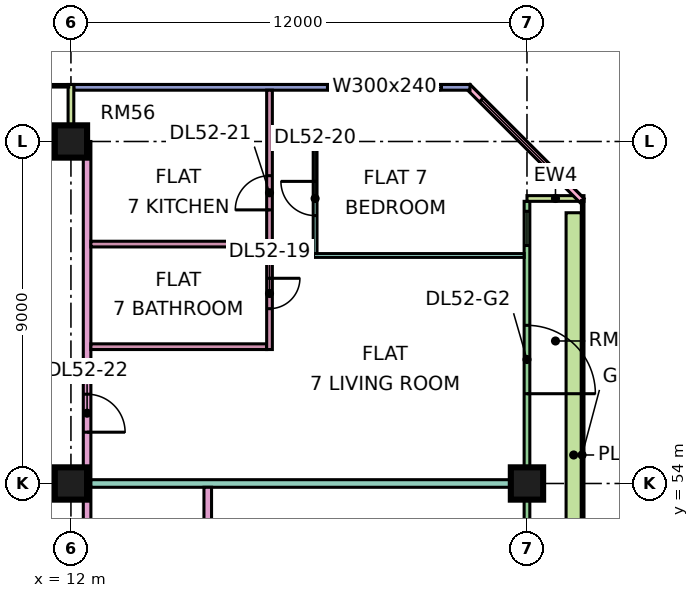
"""IFC4 building model, lengths in metres.
Left out: names, types, materials, properties, quantities, classifications, styles, units other than length and angle.
Written with IfcOpenShell. Run it as: python <this file> out.ifc"""

import sys

from ifc_helpers import new_model, si_unit, direction, frame, frame_2d, origin, origin_2d, place, context, subcontext, project, spatial, rectangle, extrude, element, fill, save


model = new_model("IFC4")
c1 = context("Model", 3, precision=1e-05, world=origin(), true_north=direction((0.0, 1.0)))
c2 = subcontext(c1, "Body", "Model", "MODEL_VIEW")
j1 = project(units=[si_unit("LENGTHUNIT", "METRE"), si_unit("PLANEANGLEUNIT", "RADIAN")], contexts=[c1])
p1 = place(None, origin())
s1 = spatial("IfcSite", under=j1, at=p1, CompositionType="ELEMENT")
p2 = place(p1, origin())
s2 = spatial("IfcBuilding", under=s1, at=p2, CompositionType="ELEMENT")
p3 = place(p2, frame((0.0, 0.0, 222.9)))
s3 = spatial("IfcBuildingStorey", under=s2, at=p3, CompositionType="ELEMENT", Elevation=222.9)
for number, where, z_axis, x_axis in (
    (1, (12.0, 54.0, 0.0), (0.0, 0.0, 1.0), (1.0, 0.0, 0.0)),
    (2, (12.0, 63.0, 0.0), (0.0, 0.0, 1.0), (1.0, 0.0, 0.0)),
    (3, (24.0, 54.0, 0.0), (0.0, 0.0, 1.0), (1.0, 0.0, 0.0)),
):
    element("IfcColumn", number, at=place(p3, frame(where, z_axis=z_axis, x_axis=x_axis)), inside=s3, PredefinedType="COLUMN", context=c2, shape_type="SweptSolid", body=[
        extrude(rectangle(XDim=0.85, YDim=0.85, at=origin_2d()), origin(), (0.0, 0.0, 1.0), 3.75),
    ])
p4 = place(p3, frame((24.0, 48.075, 0.0), z_axis=(0.0, 0.0, 1.0), x_axis=(0.0, 1.0, 0.0)))
e4 = element("IfcWall", 4, at=p4, inside=s3, PredefinedType="SOLIDWALL", context=c2, shape_type="SweptSolid", body=[
    extrude(rectangle(XDim=13.35, YDim=0.15, at=frame_2d((6.675, 0.0))), origin(), (0.0, 0.0, 1.0), 3.35),
])
p5 = place(p4, frame((0.6, 0.0, 0.45)))
e5 = element("IfcOpeningElement", 5, at=p5, cuts=e4, PredefinedType="OPENING", context=c2, shape_type="SweptSolid", body=[
    extrude(rectangle(XDim=4.2, YDim=2.4, at=frame_2d((2.1, 1.2))), frame((0.0, 0.085, 0.0), z_axis=(0.0, -1.0, 0.0), x_axis=(1.0, 0.0, 0.0)), (0.0, 0.0, 1.0), 0.17),
])
p6 = place(p4, frame((8.288, 0.0, 0.0)))
e6 = element("IfcOpeningElement", 6, at=p6, cuts=e4, PredefinedType="OPENING", context=c2, shape_type="SweptSolid", body=[
    extrude(rectangle(XDim=1.8, YDim=2.4, at=frame_2d((0.9, 1.2))), frame((0.0, 0.085, 0.0), z_axis=(0.0, -1.0, 0.0), x_axis=(1.0, 0.0, 0.0)), (0.0, 0.0, 1.0), 0.17),
])
p7 = place(p4, frame((12.188, 0.0, 0.45)))
e7 = element("IfcOpeningElement", 7, at=p7, cuts=e4, PredefinedType="OPENING", context=c2, shape_type="SweptSolid", body=[
    extrude(rectangle(XDim=0.9, YDim=2.4, at=frame_2d((0.45, 1.2))), frame((0.0, 0.085, 0.0), z_axis=(0.0, -1.0, 0.0), x_axis=(1.0, 0.0, 0.0)), (0.0, 0.0, 1.0), 0.17),
])
p8 = place(p3, frame((25.5, 61.5, 0.0), z_axis=(0.0, 0.0, 1.0), x_axis=(-1.0, 0.0, 0.0)))
e8 = element("IfcWall", 8, at=p8, inside=s3, PredefinedType="SOLIDWALL", context=c2, shape_type="SweptSolid", body=[
    extrude(rectangle(XDim=1.5, YDim=0.15, at=frame_2d((0.75, 0.0))), origin(), (0.0, 0.0, 1.0), 3.35),
])
p9 = place(p3, frame((25.447, 61.447, 0.0), z_axis=(0.0, 0.0, 1.0), x_axis=(-0.707106781187, 0.707106781187, 0.0)))
e9 = element("IfcWall", 9, at=p9, inside=s3, PredefinedType="SOLIDWALL", context=c2, shape_type="SweptSolid", body=[
    extrude(rectangle(XDim=4.243, YDim=0.15, at=frame_2d((2.121, 0.0))), origin(), (0.0, 0.0, 1.0), 3.35),
])
p10 = place(p9, frame((0.744, 0.0, 0.45)))
e10 = element("IfcOpeningElement", 10, at=p10, cuts=e9, PredefinedType="OPENING", context=c2, shape_type="SweptSolid", body=[
    extrude(rectangle(XDim=3.0, YDim=2.4, at=frame_2d((1.5, 1.2))), frame((0.0, 0.085, 0.0), z_axis=(0.0, -1.0, 0.0), x_axis=(1.0, 0.0, 0.0)), (0.0, 0.0, 1.0), 0.17),
])
p11 = place(p3, frame((22.5, 64.425, 0.0), z_axis=(0.0, 0.0, 1.0), x_axis=(-1.0, 0.0, 0.0)))
e11 = element("IfcWall", 11, at=p11, inside=s3, PredefinedType="SOLIDWALL", context=c2, shape_type="SweptSolid", body=[
    extrude(rectangle(XDim=10.425, YDim=0.15, at=frame_2d((5.212, 0.0))), origin(), (0.0, 0.0, 1.0), 3.35),
])
p12 = place(p11, frame((0.75, 0.0, 0.45)))
e12 = element("IfcOpeningElement", 12, at=p12, cuts=e11, PredefinedType="OPENING", context=c2, shape_type="SweptSolid", body=[
    extrude(rectangle(XDim=3.0, YDim=2.4, at=frame_2d((1.5, 1.2))), frame((0.0, 0.085, 0.0), z_axis=(0.0, -1.0, 0.0), x_axis=(1.0, 0.0, 0.0)), (0.0, 0.0, 1.0), 0.17),
])
p13 = place(p3, frame((11.925, 63.0, 0.0), z_axis=(0.0, 0.0, 1.0), x_axis=(-1.0, 0.0, 0.0)))
e13 = element("IfcWall", 13, at=p13, inside=s3, PredefinedType="SOLIDWALL", context=c2, shape_type="SweptSolid", body=[
    extrude(rectangle(XDim=10.35, YDim=0.15, at=frame_2d((5.175, 0.0))), origin(), (0.0, 0.0, 1.0), 3.35),
])
p14 = place(p13, frame((2.775, 0.0, 0.45)))
e14 = element("IfcOpeningElement", 14, at=p14, cuts=e13, PredefinedType="OPENING", context=c2, shape_type="SweptSolid", body=[
    extrude(rectangle(XDim=1.8, YDim=2.4, at=frame_2d((0.9, 1.2))), frame((0.0, 0.085, 0.0), z_axis=(0.0, -1.0, 0.0), x_axis=(1.0, 0.0, 0.0)), (0.0, 0.0, 1.0), 0.17),
])
p15 = place(p13, frame((6.788, 0.0, 0.0)))
e15 = element("IfcOpeningElement", 15, at=p15, cuts=e13, PredefinedType="OPENING", context=c2, shape_type="SweptSolid", body=[
    extrude(rectangle(XDim=1.8, YDim=2.4, at=frame_2d((0.9, 1.2))), frame((0.0, 0.085, 0.0), z_axis=(0.0, -1.0, 0.0), x_axis=(1.0, 0.0, 0.0)), (0.0, 0.0, 1.0), 0.17),
])
p16 = place(p3, frame((12.0, 64.5, 0.0), z_axis=(0.0, 0.0, 1.0), x_axis=(0.0, -1.0, 0.0)))
e16 = element("IfcWall", 16, at=p16, inside=s3, PredefinedType="SOLIDWALL", context=c2, shape_type="SweptSolid", body=[
    extrude(rectangle(XDim=1.5, YDim=0.15, at=frame_2d((0.75, 0.0))), origin(), (0.0, 0.0, 1.0), 3.35),
])
p17 = place(p3, frame((25.229, 48.375, 0.0), z_axis=(0.0, 0.0, 1.0), x_axis=(0.0, 1.0, 0.0)))
e17 = element("IfcWall", 17, at=p17, inside=s3, PredefinedType="SOLIDWALL", context=c2, shape_type="SweptSolid", body=[
    extrude(rectangle(XDim=12.75, YDim=0.4, at=frame_2d((6.375, 0.0))), origin(), (0.0, 0.0, 1.0), 0.7),
])
p18 = place(p3, frame((12.425, 20.0, 0.0), z_axis=(0.0, 0.0, 1.0), x_axis=(0.0, 1.0, 0.0)))
e18 = element("IfcWall", 18, at=p18, inside=s3, PredefinedType="PARTITIONING", context=c2, shape_type="SweptSolid", body=[
    extrude(rectangle(XDim=43.0, YDim=0.2, at=frame_2d((21.5, 0.0))), origin(), (0.0, 0.0, 1.0), 3.35),
])
p19 = place(p18, frame((7.15, 0.0, 0.0)))
e19 = element("IfcOpeningElement", 19, at=p19, cuts=e18, PredefinedType="OPENING", context=c2, shape_type="SweptSolid", body=[
    extrude(rectangle(XDim=1.6, YDim=2.1, at=frame_2d((0.8, 1.05))), frame((0.0, 0.11, 0.0), z_axis=(0.0, -1.0, 0.0), x_axis=(1.0, 0.0, 0.0)), (0.0, 0.0, 1.0), 0.22),
])
p20 = place(p18, frame((13.5, 0.0, 0.0)))
e20 = element("IfcOpeningElement", 20, at=p20, cuts=e18, PredefinedType="OPENING", context=c2, shape_type="SweptSolid", body=[
    extrude(rectangle(XDim=1.0, YDim=2.1, at=frame_2d((0.5, 1.05))), frame((0.0, 0.11, 0.0), z_axis=(0.0, -1.0, 0.0), x_axis=(1.0, 0.0, 0.0)), (0.0, 0.0, 1.0), 0.22),
])
p21 = place(p18, frame((22.9, 0.0, 0.0)))
e21 = element("IfcOpeningElement", 21, at=p21, cuts=e18, PredefinedType="OPENING", context=c2, shape_type="SweptSolid", body=[
    extrude(rectangle(XDim=1.0, YDim=2.1, at=frame_2d((0.5, 1.05))), frame((0.0, 0.11, 0.0), z_axis=(0.0, -1.0, 0.0), x_axis=(1.0, 0.0, 0.0)), (0.0, 0.0, 1.0), 0.22),
])
p22 = place(p18, frame((35.35, 0.0, 0.0)))
e22 = element("IfcOpeningElement", 22, at=p22, cuts=e18, PredefinedType="OPENING", context=c2, shape_type="SweptSolid", body=[
    extrude(rectangle(XDim=1.0, YDim=2.1, at=frame_2d((0.5, 1.05))), frame((0.0, 0.11, 0.0), z_axis=(0.0, -1.0, 0.0), x_axis=(1.0, 0.0, 0.0)), (0.0, 0.0, 1.0), 0.22),
])
p23 = place(p18, frame((1.15, 0.0, 0.0)))
e23 = element("IfcOpeningElement", 23, at=p23, cuts=e18, PredefinedType="OPENING", context=c2, shape_type="SweptSolid", body=[
    extrude(rectangle(XDim=1.8, YDim=2.1, at=frame_2d((0.9, 1.05))), frame((0.0, 0.11, 0.0), z_axis=(0.0, -1.0, 0.0), x_axis=(1.0, 0.0, 0.0)), (0.0, 0.0, 1.0), 0.22),
])
p24 = place(p18, frame((28.6, 0.0, 0.0)))
e24 = element("IfcOpeningElement", 24, at=p24, cuts=e18, PredefinedType="OPENING", context=c2, shape_type="SweptSolid", body=[
    extrude(rectangle(XDim=1.8, YDim=2.1, at=frame_2d((0.9, 1.05))), frame((0.0, 0.11, 0.0), z_axis=(0.0, -1.0, 0.0), x_axis=(1.0, 0.0, 0.0)), (0.0, 0.0, 1.0), 0.22),
])
p25 = place(p3, frame((12.525, 54.0, 0.0), z_axis=(0.0, 0.0, 1.0), x_axis=(1.0, 0.0, 0.0)))
e25 = element("IfcWall", 25, at=p25, inside=s3, PredefinedType="PARTITIONING", context=c2, shape_type="SweptSolid", body=[
    extrude(rectangle(XDim=11.401, YDim=0.2, at=frame_2d((5.701, 0.0))), origin(), (0.0, 0.0, 1.0), 3.35),
])
for number, where, z_axis, x_axis in (
    (26, (12.525, 57.6, 0.0), (0.0, 0.0, 1.0), (1.0, 0.0, 0.0)),
    (27, (12.525, 60.3, 0.0), (0.0, 0.0, 1.0), (1.0, 0.0, 0.0)),
):
    element("IfcWall", number, at=place(p3, frame(where, z_axis=z_axis, x_axis=x_axis)), inside=s3, PredefinedType="PARTITIONING", context=c2, shape_type="SweptSolid", body=[
        extrude(rectangle(XDim=4.625, YDim=0.15, at=frame_2d((2.312, 0.0))), origin(), (0.0, 0.0, 1.0), 3.35),
    ])
p26 = place(p3, frame((15.6, 51.225, 0.0), z_axis=(0.0, 0.0, 1.0), x_axis=(0.0, 1.0, 0.0)))
e28 = element("IfcWall", 28, at=p26, inside=s3, PredefinedType="PARTITIONING", context=c2, shape_type="SweptSolid", body=[
    extrude(rectangle(XDim=2.675, YDim=0.2, at=frame_2d((1.337, 0.0))), origin(), (0.0, 0.0, 1.0), 3.35),
])
p27 = place(p3, frame((17.225, 57.525, 0.0), z_axis=(0.0, 0.0, 1.0), x_axis=(0.0, 1.0, 0.0)))
e29 = element("IfcWall", 29, at=p27, inside=s3, PredefinedType="PARTITIONING", context=c2, shape_type="SweptSolid", body=[
    extrude(rectangle(XDim=6.825, YDim=0.15, at=frame_2d((3.413, 0.0))), origin(), (0.0, 0.0, 1.0), 3.35),
])
p28 = place(p27, frame((1.075, 0.0, 0.0)))
e30 = element("IfcOpeningElement", 30, at=p28, cuts=e29, PredefinedType="OPENING", context=c2, shape_type="SweptSolid", body=[
    extrude(rectangle(XDim=0.8, YDim=2.1, at=frame_2d((0.4, 1.05))), frame((0.0, 0.085, 0.0), z_axis=(0.0, -1.0, 0.0), x_axis=(1.0, 0.0, 0.0)), (0.0, 0.0, 1.0), 0.17),
])
p29 = place(p27, frame((3.675, 0.0, 0.0)))
e31 = element("IfcOpeningElement", 31, at=p29, cuts=e29, PredefinedType="OPENING", context=c2, shape_type="SweptSolid", body=[
    extrude(rectangle(XDim=0.9, YDim=2.1, at=frame_2d((0.45, 1.05))), frame((0.0, 0.085, 0.0), z_axis=(0.0, -1.0, 0.0), x_axis=(1.0, 0.0, 0.0)), (0.0, 0.0, 1.0), 0.17),
])
p30 = place(p3, frame((18.0, 63.0, 0.0), z_axis=(0.0, 0.0, 1.0), x_axis=(1.0, 0.0, 0.0)))
e32 = element("IfcWall", 32, at=p30, inside=s3, PredefinedType="PARTITIONING", context=c2, shape_type="SweptSolid", body=[
    extrude(rectangle(XDim=0.375, YDim=0.1, at=frame_2d((0.188, 0.0))), origin(), (0.0, 0.0, 1.0), 3.35),
])
p31 = place(p3, frame((18.375, 60.0, 0.0), z_axis=(0.0, 0.0, 1.0), x_axis=(1.0, 0.0, 0.0)))
e33 = element("IfcWall", 33, at=p31, inside=s3, PredefinedType="PARTITIONING", context=c2, shape_type="SweptSolid", body=[
    extrude(rectangle(XDim=5.551, YDim=0.1, at=frame_2d((2.775, 0.0))), origin(), (0.0, 0.0, 1.0), 3.35),
])
p32 = place(p3, frame((18.425, 60.05, 0.0), z_axis=(0.0, 0.0, 1.0), x_axis=(0.0, 1.0, 0.0)))
e34 = element("IfcWall", 34, at=p32, inside=s3, PredefinedType="PARTITIONING", context=c2, shape_type="SweptSolid", body=[
    extrude(rectangle(XDim=3.0, YDim=0.1, at=frame_2d((1.5, 0.0))), origin(), (0.0, 0.0, 1.0), 3.35),
])
p33 = place(p32, frame((1.0, 0.0, 0.0)))
e35 = element("IfcOpeningElement", 35, at=p33, cuts=e34, PredefinedType="OPENING", context=c2, shape_type="SweptSolid", body=[
    extrude(rectangle(XDim=0.9, YDim=2.1, at=frame_2d((0.45, 1.05))), frame((0.0, 0.06, 0.0), z_axis=(0.0, -1.0, 0.0), x_axis=(1.0, 0.0, 0.0)), (0.0, 0.0, 1.0), 0.12),
])
p34 = place(p6, frame((1.8, 0.0, 0.0), z_axis=(0.0, 0.0, 1.0), x_axis=(-1.0, 0.0, 0.0)))
e36 = element("IfcDoor", 36, at=p34, inside=s3, OperationType="DOUBLE_DOOR_SINGLE_SWING", PredefinedType="DOOR", context=c2, shape_type="SweptSolid", body=[
    extrude(rectangle(XDim=1.8, YDim=2.4, at=frame_2d((0.9, 1.2))), frame((0.0, 0.025, 0.0), z_axis=(0.0, -1.0, 0.0), x_axis=(1.0, 0.0, 0.0)), (0.0, 0.0, 1.0), 0.05),
])
fill(e6, e36)
p35 = place(p7, origin())
e37 = element("IfcWindow", 37, at=p35, inside=s3, PartitioningType="SINGLE_PANEL", PredefinedType="WINDOW", context=c2, shape_type="SweptSolid", body=[
    extrude(rectangle(XDim=0.9, YDim=2.4, at=frame_2d((0.45, 1.2))), frame((0.0, 0.03, 0.0), z_axis=(0.0, -1.0, 0.0), x_axis=(1.0, 0.0, 0.0)), (0.0, 0.0, 1.0), 0.06),
])
fill(e7, e37)
p36 = place(p10, origin())
e38 = element("IfcWindow", 38, at=p36, inside=s3, PartitioningType="SINGLE_PANEL", PredefinedType="WINDOW", context=c2, shape_type="SweptSolid", body=[
    extrude(rectangle(XDim=3.0, YDim=2.4, at=frame_2d((1.5, 1.2))), frame((0.0, 0.03, 0.0), z_axis=(0.0, -1.0, 0.0), x_axis=(1.0, 0.0, 0.0)), (0.0, 0.0, 1.0), 0.06),
])
fill(e10, e38)
p37 = place(p12, origin())
e39 = element("IfcWindow", 39, at=p37, inside=s3, PartitioningType="SINGLE_PANEL", PredefinedType="WINDOW", context=c2, shape_type="SweptSolid", body=[
    extrude(rectangle(XDim=3.0, YDim=2.4, at=frame_2d((1.5, 1.2))), frame((0.0, 0.03, 0.0), z_axis=(0.0, -1.0, 0.0), x_axis=(1.0, 0.0, 0.0)), (0.0, 0.0, 1.0), 0.06),
])
fill(e12, e39)
p38 = place(p28, origin())
e40 = element("IfcDoor", 40, at=p38, inside=s3, OperationType="SINGLE_SWING_RIGHT", PredefinedType="DOOR", context=c2, shape_type="SweptSolid", body=[
    extrude(rectangle(XDim=0.8, YDim=2.1, at=frame_2d((0.4, 1.05))), frame((0.0, 0.025, 0.0), z_axis=(0.0, -1.0, 0.0), x_axis=(1.0, 0.0, 0.0)), (0.0, 0.0, 1.0), 0.05),
])
fill(e30, e40)
p39 = place(p33, frame((0.9, 0.0, 0.0), z_axis=(0.0, 0.0, 1.0), x_axis=(-1.0, 0.0, 0.0)))
e41 = element("IfcDoor", 41, at=p39, inside=s3, OperationType="SINGLE_SWING_RIGHT", PredefinedType="DOOR", context=c2, shape_type="SweptSolid", body=[
    extrude(rectangle(XDim=0.9, YDim=2.1, at=frame_2d((0.45, 1.05))), frame((0.0, 0.025, 0.0), z_axis=(0.0, -1.0, 0.0), x_axis=(1.0, 0.0, 0.0)), (0.0, 0.0, 1.0), 0.05),
])
fill(e35, e41)
p40 = place(p29, origin())
e42 = element("IfcDoor", 42, at=p40, inside=s3, OperationType="SINGLE_SWING_LEFT", PredefinedType="DOOR", context=c2, shape_type="SweptSolid", body=[
    extrude(rectangle(XDim=0.9, YDim=2.1, at=frame_2d((0.45, 1.05))), frame((0.0, 0.025, 0.0), z_axis=(0.0, -1.0, 0.0), x_axis=(1.0, 0.0, 0.0)), (0.0, 0.0, 1.0), 0.05),
])
fill(e31, e42)
p41 = place(p22, frame((1.0, 0.0, 0.0), z_axis=(0.0, 0.0, 1.0), x_axis=(-1.0, 0.0, 0.0)))
e43 = element("IfcDoor", 43, at=p41, inside=s3, OperationType="SINGLE_SWING_LEFT", PredefinedType="DOOR", context=c2, shape_type="SweptSolid", body=[
    extrude(rectangle(XDim=1.0, YDim=2.1, at=frame_2d((0.5, 1.05))), frame((0.0, 0.025, 0.0), z_axis=(0.0, -1.0, 0.0), x_axis=(1.0, 0.0, 0.0)), (0.0, 0.0, 1.0), 0.05),
])
fill(e22, e43)
save(model, sys.argv[1])
